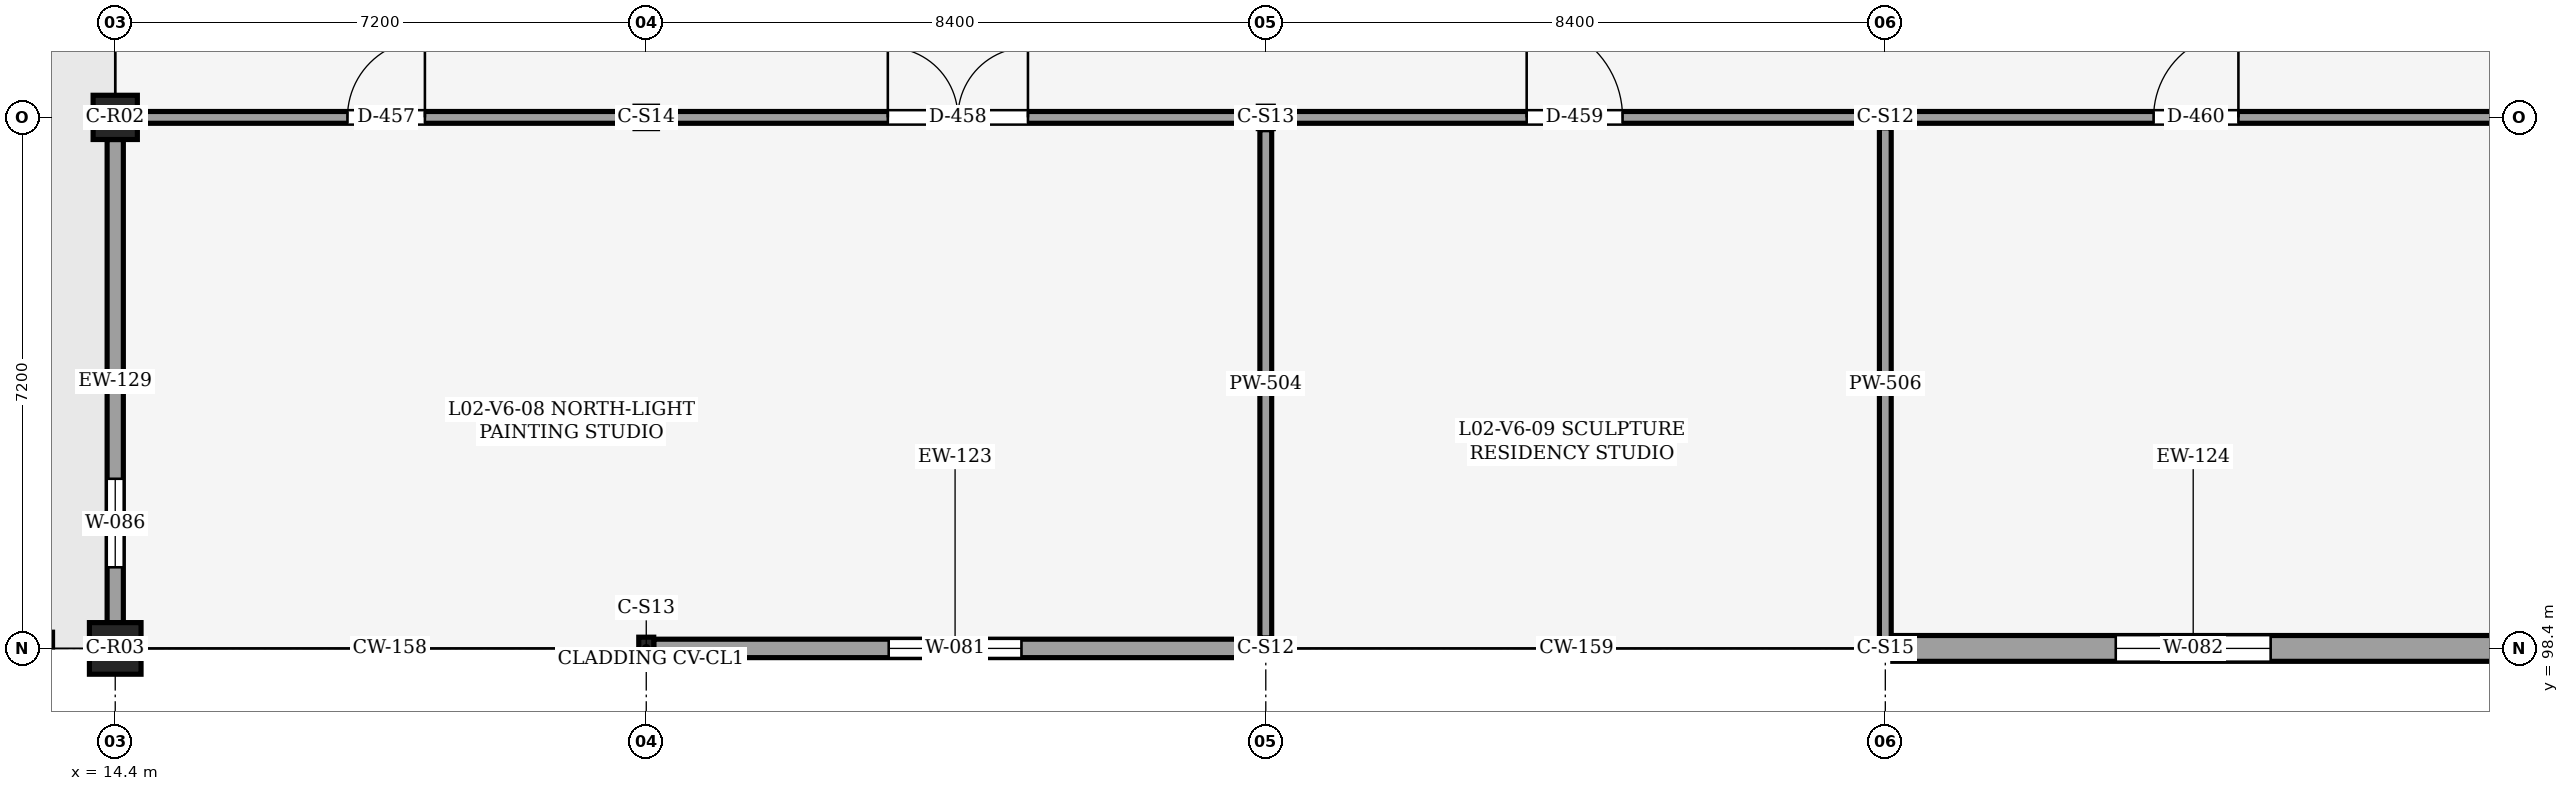
"""IFC4 building model, lengths in metres.
Left out: names, types, materials, properties, quantities, classifications, styles, units other than length and angle.
Written with IfcOpenShell. Run it as: python <this file> out.ifc"""

import sys

from ifc_helpers import new_model, si_unit, direction, frame, frame_2d, origin, origin_2d, place, context, subcontext, project, spatial, rectangle, hollow_rectangle, extrude, element, fill, save


model = new_model("IFC4")
c1 = context("Model", 3, precision=1e-05, world=origin(), true_north=direction((0.0, 1.0)))
c2 = subcontext(c1, "Body", "Model", "MODEL_VIEW")
j1 = project(units=[si_unit("LENGTHUNIT", "METRE"), si_unit("PLANEANGLEUNIT", "RADIAN")], contexts=[c1])
p1 = place(None, origin())
s1 = spatial("IfcSite", under=j1, at=p1, CompositionType="ELEMENT")
p2 = place(p1, origin())
s2 = spatial("IfcBuilding", under=s1, at=p2, CompositionType="ELEMENT")
p3 = place(p2, frame((0.0, 0.0, 10.2)))
s3 = spatial("IfcBuildingStorey", under=s2, at=p3, CompositionType="ELEMENT", Elevation=10.2)
p4 = place(p3, frame((14.4, 98.4, 0.0), z_axis=(0.0, 0.0, 1.0), x_axis=(1.0, 0.0, 0.0)))
e1 = element("IfcColumn", 1, at=p4, inside=s3, PredefinedType="COLUMN", context=c2, shape_type="SweptSolid", body=[
    extrude(rectangle(XDim=0.7, YDim=0.7, at=origin_2d()), origin(), (0.0, 0.0, 1.0), 4.8),
])
p5 = place(p3, frame((14.4, 105.6, 0.0), z_axis=(0.0, 0.0, 1.0), x_axis=(1.0, 0.0, 0.0)))
e2 = element("IfcColumn", 2, at=p5, inside=s3, PredefinedType="COLUMN", context=c2, shape_type="SweptSolid", body=[
    extrude(rectangle(XDim=0.6, YDim=0.6, at=origin_2d()), origin(), (0.0, 0.0, 1.0), 4.8),
])
p6 = place(p3, frame((21.6, 98.4, 0.0), z_axis=(0.0, 0.0, 1.0), x_axis=(1.0, 0.0, 0.0)))
e3 = element("IfcColumn", 3, at=p6, inside=s3, PredefinedType="COLUMN", context=c2, shape_type="SweptSolid", body=[
    extrude(hollow_rectangle(XDim=0.203, YDim=0.305, WallThickness=0.013, OuterFilletRadius=0.025, at=origin_2d()), origin(), (0.0, 0.0, 1.0), 4.8),
])
p7 = place(p3, frame((21.6, 105.6, 0.0), z_axis=(0.0, 0.0, 1.0), x_axis=(1.0, 0.0, 0.0)))
e4 = element("IfcColumn", 4, at=p7, inside=s3, PredefinedType="COLUMN", context=c2, shape_type="SweptSolid", body=[
    extrude(hollow_rectangle(XDim=0.305, YDim=0.305, WallThickness=0.016, OuterFilletRadius=0.032, at=origin_2d()), origin(), (0.0, 0.0, 1.0), 4.8),
])
p8 = place(p3, frame((30.0, 98.4, 0.0), z_axis=(0.0, 0.0, 1.0), x_axis=(1.0, 0.0, 0.0)))
e5 = element("IfcColumn", 5, at=p8, inside=s3, PredefinedType="COLUMN", context=c2, shape_type="SweptSolid", body=[
    extrude(hollow_rectangle(XDim=0.254, YDim=0.254, WallThickness=0.013, OuterFilletRadius=0.025, at=origin_2d()), origin(), (0.0, 0.0, 1.0), 4.8),
])
p9 = place(p3, frame((30.0, 105.6, 0.0), z_axis=(0.0, 0.0, 1.0), x_axis=(1.0, 0.0, 0.0)))
e6 = element("IfcColumn", 6, at=p9, inside=s3, PredefinedType="COLUMN", context=c2, shape_type="SweptSolid", body=[
    extrude(hollow_rectangle(XDim=0.203, YDim=0.305, WallThickness=0.013, OuterFilletRadius=0.025, at=origin_2d()), origin(), (0.0, 0.0, 1.0), 4.8),
])
p10 = place(p3, frame((38.4, 98.4, 0.0), z_axis=(0.0, 0.0, 1.0), x_axis=(1.0, 0.0, 0.0)))
e7 = element("IfcColumn", 7, at=p10, inside=s3, PredefinedType="COLUMN", context=c2, shape_type="SweptSolid", body=[
    extrude(hollow_rectangle(XDim=0.203, YDim=0.203, WallThickness=0.013, OuterFilletRadius=0.025, at=origin_2d()), origin(), (0.0, 0.0, 1.0), 4.8),
])
p11 = place(p3, frame((38.4, 105.6, 0.0), z_axis=(0.0, 0.0, 1.0), x_axis=(1.0, 0.0, 0.0)))
e8 = element("IfcColumn", 8, at=p11, inside=s3, PredefinedType="COLUMN", context=c2, shape_type="SweptSolid", body=[
    extrude(hollow_rectangle(XDim=0.254, YDim=0.254, WallThickness=0.013, OuterFilletRadius=0.025, at=origin_2d()), origin(), (0.0, 0.0, 1.0), 4.8),
])
p12 = place(p3, frame((29.873, 98.4, 0.0), z_axis=(0.0, 0.0, 1.0), x_axis=(-1.0, 0.0, 0.0)))
e9 = element("IfcWall", 9, at=p12, inside=s3, PredefinedType="SOLIDWALL", context=c2, shape_type="SweptSolid", body=[
    extrude(rectangle(XDim=8.171, YDim=0.25, at=frame_2d((4.086, 0.0))), origin(), (0.0, 0.0, 1.0), 3.695),
])
p13 = place(p12, frame((3.186, 0.0, 0.9)))
e10 = element("IfcOpeningElement", 10, at=p13, cuts=e9, PredefinedType="OPENING", context=c2, shape_type="SweptSolid", body=[
    extrude(rectangle(XDim=1.8, YDim=1.75, at=frame_2d((0.9, 0.875))), frame((0.0, 0.135, 0.0), z_axis=(0.0, -1.0, 0.0), x_axis=(1.0, 0.0, 0.0)), (0.0, 0.0, 1.0), 0.271),
])
p14 = place(p3, frame((46.648, 98.4, 0.0), z_axis=(0.0, 0.0, 1.0), x_axis=(-1.0, 0.0, 0.0)))
e11 = element("IfcWall", 11, at=p14, inside=s3, PredefinedType="SOLIDWALL", context=c2, shape_type="SweptSolid", body=[
    extrude(rectangle(XDim=8.146, YDim=0.35, at=frame_2d((4.073, 0.0))), origin(), (0.0, 0.0, 1.0), 3.695),
])
p15 = place(p14, frame((3.023, 0.0, 0.9)))
e12 = element("IfcOpeningElement", 12, at=p15, cuts=e11, PredefinedType="OPENING", context=c2, shape_type="SweptSolid", body=[
    extrude(rectangle(XDim=2.1, YDim=1.75, at=frame_2d((1.05, 0.875))), frame((0.0, 0.185, 0.0), z_axis=(0.0, -1.0, 0.0), x_axis=(1.0, 0.0, 0.0)), (0.0, 0.0, 1.0), 0.371),
])
p16 = place(p3, frame((14.4, 98.75, 0.0), z_axis=(0.0, 0.0, 1.0), x_axis=(0.0, 1.0, 0.0)))
e13 = element("IfcWall", 13, at=p16, inside=s3, PredefinedType="SOLIDWALL", context=c2, shape_type="SweptSolid", body=[
    extrude(rectangle(XDim=6.55, YDim=0.22, at=frame_2d((3.275, 0.0))), origin(), (0.0, 0.0, 1.0), 4.56),
])
p17 = place(p16, frame((0.75, 0.0, 0.9)))
e14 = element("IfcOpeningElement", 14, at=p17, cuts=e13, PredefinedType="OPENING", context=c2, shape_type="SweptSolid", body=[
    extrude(rectangle(XDim=1.2, YDim=1.5, at=frame_2d((0.6, 0.75))), frame((0.0, 0.12, 0.0), z_axis=(0.0, -1.0, 0.0), x_axis=(1.0, 0.0, 0.0)), (0.0, 0.0, 1.0), 0.24),
])
p18 = place(p3, frame((14.715, 105.6, 0.0), z_axis=(0.0, 0.0, 1.0), x_axis=(1.0, 0.0, 0.0)))
e15 = element("IfcWall", 15, at=p18, inside=s3, PredefinedType="PARTITIONING", context=c2, shape_type="SweptSolid", body=[
    extrude(rectangle(XDim=6.718, YDim=0.16, at=frame_2d((3.359, 0.0))), origin(), (0.0, 0.0, 1.0), 4.54),
])
p19 = place(p18, frame((2.834, 0.0, 0.0)))
e16 = element("IfcOpeningElement", 16, at=p19, cuts=e15, PredefinedType="OPENING", context=c2, shape_type="SweptSolid", body=[
    extrude(rectangle(XDim=1.05, YDim=2.15, at=frame_2d((0.525, 1.075))), frame((0.0, 0.09, 0.0), z_axis=(0.0, -1.0, 0.0), x_axis=(1.0, 0.0, 0.0)), (0.0, 0.0, 1.0), 0.18),
])
p20 = place(p3, frame((21.767, 105.6, 0.0), z_axis=(0.0, 0.0, 1.0), x_axis=(1.0, 0.0, 0.0)))
e17 = element("IfcWall", 17, at=p20, inside=s3, PredefinedType="PARTITIONING", context=c2, shape_type="SweptSolid", body=[
    extrude(rectangle(XDim=8.116, YDim=0.16, at=frame_2d((4.058, 0.0))), origin(), (0.0, 0.0, 1.0), 4.54),
])
p21 = place(p20, frame((3.108, 0.0, 0.0)))
e18 = element("IfcOpeningElement", 18, at=p21, cuts=e17, PredefinedType="OPENING", context=c2, shape_type="SweptSolid", body=[
    extrude(rectangle(XDim=1.9, YDim=2.45, at=frame_2d((0.95, 1.225))), frame((0.0, 0.09, 0.0), z_axis=(0.0, -1.0, 0.0), x_axis=(1.0, 0.0, 0.0)), (0.0, 0.0, 1.0), 0.18),
])
p22 = place(p3, frame((30.0, 98.542, 0.0), z_axis=(0.0, 0.0, 1.0), x_axis=(0.0, 1.0, 0.0)))
e19 = element("IfcWall", 19, at=p22, inside=s3, PredefinedType="PARTITIONING", context=c2, shape_type="SweptSolid", body=[
    extrude(rectangle(XDim=6.891, YDim=0.16, at=frame_2d((3.445, 0.0))), origin(), (0.0, 0.0, 1.0), 4.54),
])
p23 = place(p3, frame((30.117, 105.6, 0.0), z_axis=(0.0, 0.0, 1.0), x_axis=(1.0, 0.0, 0.0)))
e20 = element("IfcWall", 20, at=p23, inside=s3, PredefinedType="PARTITIONING", context=c2, shape_type="SweptSolid", body=[
    extrude(rectangle(XDim=8.141, YDim=0.16, at=frame_2d((4.071, 0.0))), origin(), (0.0, 0.0, 1.0), 4.54),
])
p24 = place(p23, frame((3.421, 0.0, 0.0)))
e21 = element("IfcOpeningElement", 21, at=p24, cuts=e20, PredefinedType="OPENING", context=c2, shape_type="SweptSolid", body=[
    extrude(rectangle(XDim=1.3, YDim=2.2, at=frame_2d((0.65, 1.1))), frame((0.0, 0.09, 0.0), z_axis=(0.0, -1.0, 0.0), x_axis=(1.0, 0.0, 0.0)), (0.0, 0.0, 1.0), 0.18),
])
p25 = place(p3, frame((38.4, 98.517, 0.0), z_axis=(0.0, 0.0, 1.0), x_axis=(0.0, 1.0, 0.0)))
e22 = element("IfcWall", 22, at=p25, inside=s3, PredefinedType="PARTITIONING", context=c2, shape_type="SweptSolid", body=[
    extrude(rectangle(XDim=6.941, YDim=0.16, at=frame_2d((3.471, 0.0))), origin(), (0.0, 0.0, 1.0), 4.54),
])
p26 = place(p3, frame((38.542, 105.6, 0.0), z_axis=(0.0, 0.0, 1.0), x_axis=(1.0, 0.0, 0.0)))
e23 = element("IfcWall", 23, at=p26, inside=s3, PredefinedType="PARTITIONING", context=c2, shape_type="SweptSolid", body=[
    extrude(rectangle(XDim=8.141, YDim=0.16, at=frame_2d((4.071, 0.0))), origin(), (0.0, 0.0, 1.0), 4.54),
])
p27 = place(p26, frame((3.496, 0.0, 0.0)))
e24 = element("IfcOpeningElement", 24, at=p27, cuts=e23, PredefinedType="OPENING", context=c2, shape_type="SweptSolid", body=[
    extrude(rectangle(XDim=1.15, YDim=2.2, at=frame_2d((0.575, 1.1))), frame((0.0, 0.09, 0.0), z_axis=(0.0, -1.0, 0.0), x_axis=(1.0, 0.0, 0.0)), (0.0, 0.0, 1.0), 0.18),
])
p28 = place(p13, origin())
e25 = element("IfcWindow", 25, at=p28, inside=s3, PartitioningType="SINGLE_PANEL", PredefinedType="WINDOW", context=c2, shape_type="SweptSolid", body=[
    extrude(rectangle(XDim=1.8, YDim=1.75, at=frame_2d((0.9, 0.875))), frame((0.0, 0.03, 0.0), z_axis=(0.0, -1.0, 0.0), x_axis=(1.0, 0.0, 0.0)), (0.0, 0.0, 1.0), 0.06),
])
fill(e10, e25)
p29 = place(p15, origin())
e26 = element("IfcWindow", 26, at=p29, inside=s3, PartitioningType="SINGLE_PANEL", PredefinedType="WINDOW", context=c2, shape_type="SweptSolid", body=[
    extrude(rectangle(XDim=2.1, YDim=1.75, at=frame_2d((1.05, 0.875))), frame((0.0, 0.03, 0.0), z_axis=(0.0, -1.0, 0.0), x_axis=(1.0, 0.0, 0.0)), (0.0, 0.0, 1.0), 0.06),
])
fill(e12, e26)
p30 = place(p17, origin())
e27 = element("IfcWindow", 27, at=p30, inside=s3, PartitioningType="SINGLE_PANEL", PredefinedType="WINDOW", context=c2, shape_type="SweptSolid", body=[
    extrude(rectangle(XDim=1.2, YDim=1.5, at=frame_2d((0.6, 0.75))), frame((0.0, 0.03, 0.0), z_axis=(0.0, -1.0, 0.0), x_axis=(1.0, 0.0, 0.0)), (0.0, 0.0, 1.0), 0.06),
])
fill(e14, e27)
p31 = place(p19, origin())
e28 = element("IfcDoor", 28, at=p31, inside=s3, OperationType="SINGLE_SWING_RIGHT", PredefinedType="DOOR", context=c2, shape_type="SweptSolid", body=[
    extrude(rectangle(XDim=1.05, YDim=2.15, at=frame_2d((0.525, 1.075))), frame((0.0, 0.025, 0.0), z_axis=(0.0, -1.0, 0.0), x_axis=(1.0, 0.0, 0.0)), (0.0, 0.0, 1.0), 0.05),
])
fill(e16, e28)
p32 = place(p21, origin())
e29 = element("IfcDoor", 29, at=p32, inside=s3, OperationType="DOUBLE_DOOR_SINGLE_SWING", PredefinedType="DOOR", context=c2, shape_type="SweptSolid", body=[
    extrude(rectangle(XDim=1.9, YDim=2.45, at=frame_2d((0.95, 1.225))), frame((0.0, 0.025, 0.0), z_axis=(0.0, -1.0, 0.0), x_axis=(1.0, 0.0, 0.0)), (0.0, 0.0, 1.0), 0.05),
])
fill(e18, e29)
p33 = place(p24, origin())
e30 = element("IfcDoor", 30, at=p33, inside=s3, OperationType="SINGLE_SWING_LEFT", PredefinedType="DOOR", context=c2, shape_type="SweptSolid", body=[
    extrude(rectangle(XDim=1.3, YDim=2.2, at=frame_2d((0.65, 1.1))), frame((0.0, 0.025, 0.0), z_axis=(0.0, -1.0, 0.0), x_axis=(1.0, 0.0, 0.0)), (0.0, 0.0, 1.0), 0.05),
])
fill(e21, e30)
p34 = place(p27, origin())
e31 = element("IfcDoor", 31, at=p34, inside=s3, OperationType="SINGLE_SWING_RIGHT", PredefinedType="DOOR", context=c2, shape_type="SweptSolid", body=[
    extrude(rectangle(XDim=1.15, YDim=2.2, at=frame_2d((0.575, 1.1))), frame((0.0, 0.025, 0.0), z_axis=(0.0, -1.0, 0.0), x_axis=(1.0, 0.0, 0.0)), (0.0, 0.0, 1.0), 0.05),
])
fill(e24, e31)
save(model, sys.argv[1])
